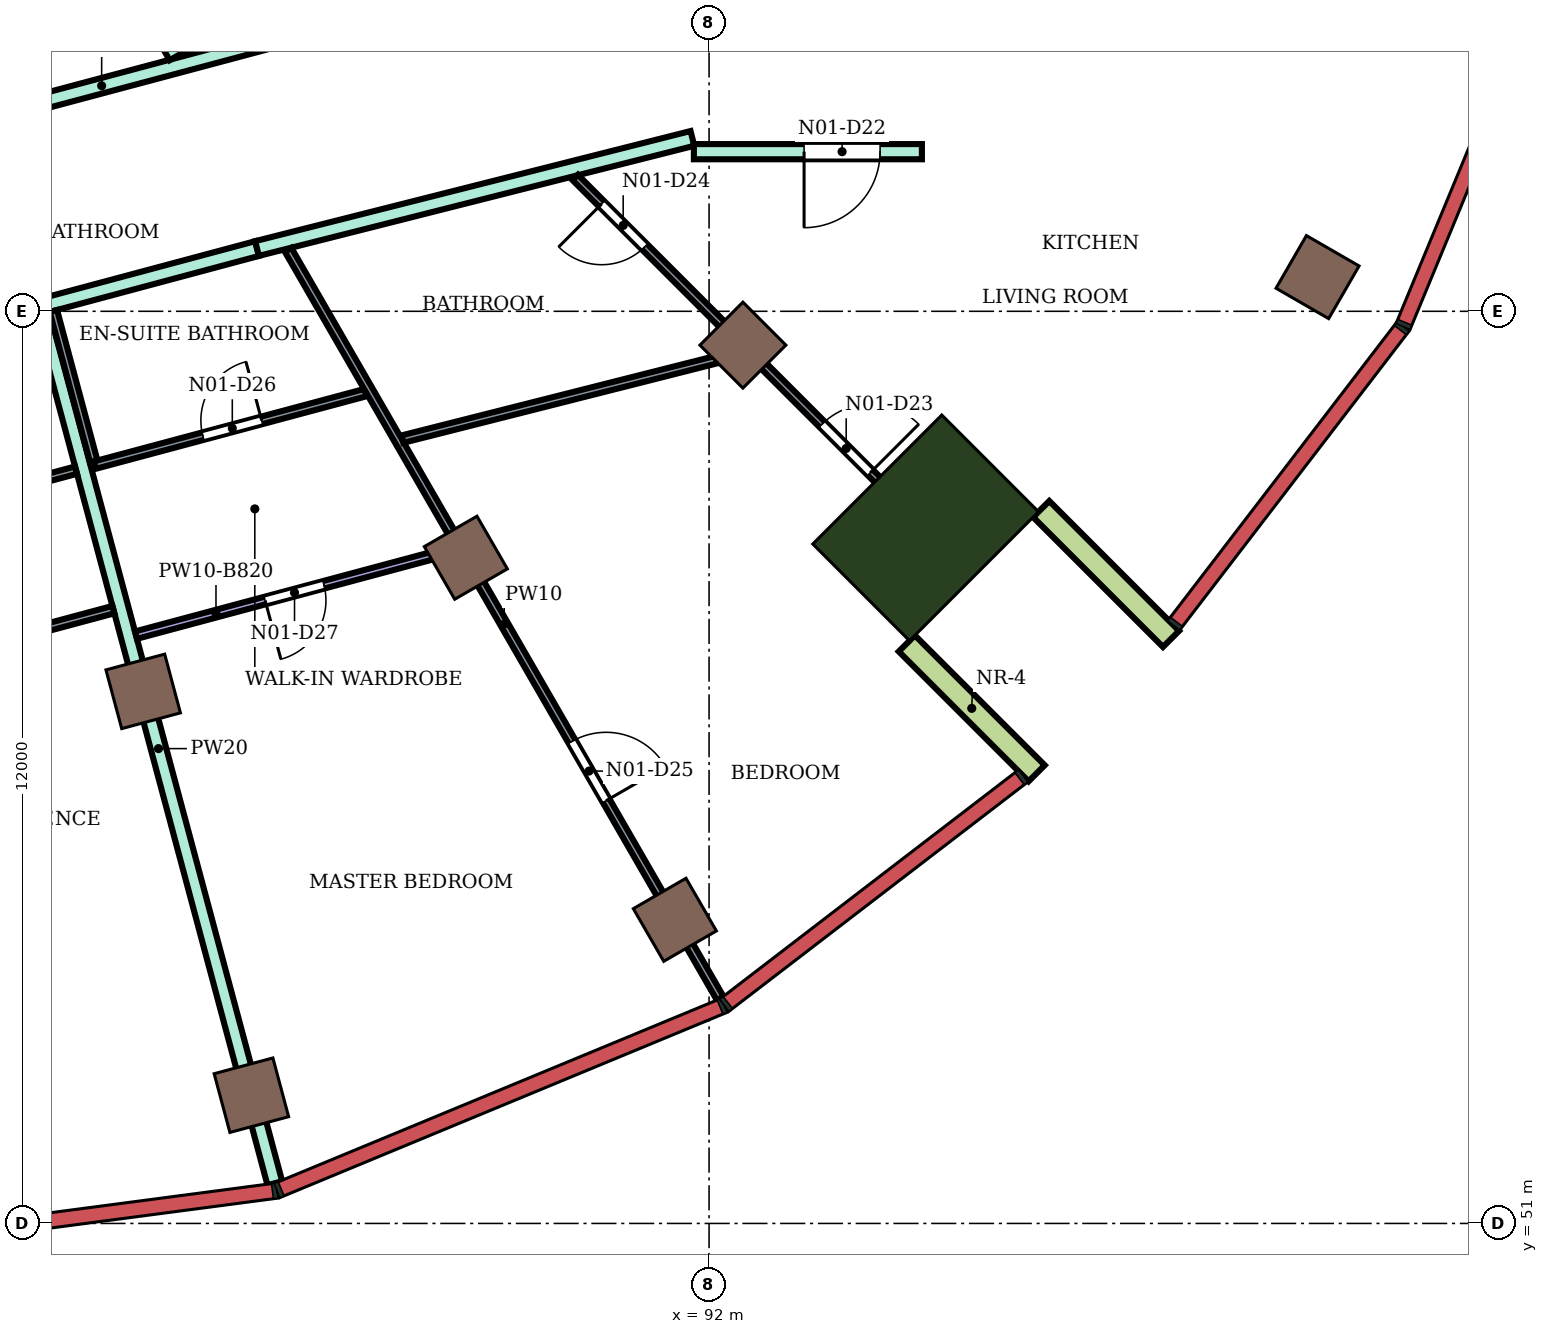
"""IFC4 building model, lengths in metres.
Left out: names, types, materials, properties, quantities, classifications, styles, units other than length and angle.
Written with IfcOpenShell. Run it as: python <this file> out.ifc"""

import sys

from ifc_helpers import new_model, si_unit, direction, frame, frame_2d, origin, origin_2d, place, context, subcontext, project, spatial, rectangle, extrude, element, fill, save


model = new_model("IFC4")
c1 = context("Model", 3, precision=1e-05, world=origin(), true_north=direction((0.0, 1.0)))
c2 = subcontext(c1, "Body", "Model", "MODEL_VIEW")
j1 = project(units=[si_unit("LENGTHUNIT", "METRE"), si_unit("PLANEANGLEUNIT", "RADIAN")], contexts=[c1])
p1 = place(None, origin())
s1 = spatial("IfcSite", under=j1, at=p1, CompositionType="ELEMENT")
p2 = place(p1, origin())
s2 = spatial("IfcBuilding", under=s1, at=p2, CompositionType="ELEMENT")
p3 = place(p2, frame((0.0, 0.0, 279.9)))
s3 = spatial("IfcBuildingStorey", under=s2, at=p3, CompositionType="ELEMENT", Elevation=279.9)
for number, where, z_axis, x_axis in (
    (1, (85.979, 52.687, 0.0), (0.0, 0.0, 1.0), (0.259, -0.966, 0.0)),
    (2, (91.55, 54.995, 0.0), (0.0, 0.0, 1.0), (0.5, -0.866, 0.0)),
    (3, (100.005, 63.45, 0.0), (0.0, 0.0, 1.0), (0.866, -0.5, 0.0)),
    (4, (84.555, 58.0, 0.0), (0.0, 0.0, 1.0), (0.259, -0.966, 0.0)),
    (5, (88.8, 59.758, 0.0), (0.0, 0.0, 1.0), (0.5, -0.866, 0.0)),
    (6, (92.445, 62.555, 0.0), (0.0, 0.0, 1.0), (0.707, -0.707, 0.0)),
):
    element("IfcColumn", number, at=place(p3, frame(where, z_axis=z_axis, x_axis=x_axis)), inside=s3, PredefinedType="COLUMN", context=c2, shape_type="SweptSolid", body=[
        extrude(rectangle(XDim=0.8, YDim=0.8, at=origin_2d()), origin(), (0.0, 0.0, 1.0), 4.2),
    ])
p4 = place(p3, frame((94.849, 60.151, 0.0), z_axis=(0.0, 0.0, 1.0), x_axis=(0.707106781187, -0.707106781187, 0.0)))
e7 = element("IfcColumn", 7, at=p4, inside=s3, PredefinedType="COLUMN", context=c2, shape_type="SweptSolid", body=[
    extrude(rectangle(XDim=1.8, YDim=2.4, at=origin_2d()), origin(), (0.0, 0.0, 1.0), 4.2),
])
for number, where, z_axis, x_axis in (
    (8, (94.602, 58.63, 0.0), (0.0, 0.0, 1.0), (0.707, -0.707, 0.0)),
    (9, (96.37, 60.398, 0.0), (0.0, 0.0, 1.0), (0.707, -0.707, 0.0)),
):
    element("IfcWall", number, at=place(p3, frame(where, z_axis=z_axis, x_axis=x_axis)), inside=s3, PredefinedType="NOTDEFINED", context=c2, shape_type="SweptSolid", body=[
        extrude(rectangle(XDim=2.416, YDim=0.3, at=frame_2d((1.208, 0.0))), origin(), (0.0, 0.0, 1.0), 4.2),
    ])
p5 = place(p3, frame((80.125, 64.932, 0.0), z_axis=(0.0, 0.0, 1.0), x_axis=(0.966236955806, 0.257655089674, 0.0)))
e10 = element("IfcWall", 10, at=p5, inside=s3, PredefinedType="PARTITIONING", context=c2, shape_type="SweptSolid", body=[
    extrude(rectangle(XDim=8.039, YDim=0.2, at=frame_2d((4.02, 0.0))), origin(), (0.0, 0.0, 1.0), 3.75),
])
p6 = place(p5, frame((6.298, 0.0, 0.0)))
e11 = element("IfcOpeningElement", 11, at=p6, cuts=e10, PredefinedType="OPENING", context=c2, shape_type="SweptSolid", body=[
    extrude(rectangle(XDim=0.9, YDim=2.1, at=frame_2d((0.45, 1.05))), frame((0.0, 0.11, 0.0), z_axis=(0.0, -1.0, 0.0), x_axis=(1.0, 0.0, 0.0)), (0.0, 0.0, 1.0), 0.22),
])
p7 = place(p5, frame((2.045, 0.0, 0.0)))
e12 = element("IfcOpeningElement", 12, at=p7, cuts=e10, PredefinedType="OPENING", context=c2, shape_type="SweptSolid", body=[
    extrude(rectangle(XDim=0.9, YDim=2.1, at=frame_2d((0.45, 1.05))), frame((0.0, 0.11, 0.0), z_axis=(0.0, -1.0, 0.0), x_axis=(1.0, 0.0, 0.0)), (0.0, 0.0, 1.0), 0.22),
])
p8 = place(p3, frame((80.0, 62.204, 0.0), z_axis=(0.0, 0.0, 1.0), x_axis=(0.965960221635, 0.258690645788, 0.0)))
e13 = element("IfcWall", 13, at=p8, inside=s3, PredefinedType="PARTITIONING", context=c2, shape_type="SweptSolid", body=[
    extrude(rectangle(XDim=6.267, YDim=0.2, at=frame_2d((3.133, 0.0))), origin(), (0.0, 0.0, 1.0), 3.75),
])
p9 = place(p8, frame((0.382, 0.0, 0.0)))
e14 = element("IfcOpeningElement", 14, at=p9, cuts=e13, PredefinedType="OPENING", context=c2, shape_type="SweptSolid", body=[
    extrude(rectangle(XDim=1.0, YDim=2.1, at=frame_2d((0.5, 1.05))), frame((0.0, 0.11, 0.0), z_axis=(0.0, -1.0, 0.0), x_axis=(1.0, 0.0, 0.0)), (0.0, 0.0, 1.0), 0.22),
])
p10 = place(p3, frame((83.225, 62.965, 0.0), z_axis=(0.0, 0.0, 1.0), x_axis=(0.258656021451, -0.965969493601, 0.0)))
e15 = element("IfcWall", 15, at=p10, inside=s3, PredefinedType="PARTITIONING", context=c2, shape_type="SweptSolid", body=[
    extrude(rectangle(XDim=11.838, YDim=0.2, at=frame_2d((5.919, 0.0))), origin(), (0.0, 0.0, 1.0), 3.75),
])
p11 = place(p3, frame((83.848, 68.332, 0.0), z_axis=(0.0, 0.0, 1.0), x_axis=(0.499953638813, -0.866052168773, 0.0)))
e16 = element("IfcWall", 16, at=p11, inside=s3, PredefinedType="PARTITIONING", context=c2, shape_type="SweptSolid", body=[
    extrude(rectangle(XDim=2.285, YDim=0.2, at=frame_2d((1.143, 0.0))), origin(), (0.0, 0.0, 1.0), 3.75),
])
p12 = place(p3, frame((86.053, 63.826, 0.0), z_axis=(0.0, 0.0, 1.0), x_axis=(0.969490004987, 0.245130843083, 0.0)))
e17 = element("IfcWall", 17, at=p12, inside=s3, PredefinedType="PARTITIONING", context=c2, shape_type="SweptSolid", body=[
    extrude(rectangle(XDim=5.908, YDim=0.2, at=frame_2d((2.954, 0.0))), origin(), (0.0, 0.0, 1.0), 3.75),
])
p13 = place(p3, frame((91.8, 65.1, 0.0), z_axis=(0.0, 0.0, 1.0), x_axis=(1.0, 0.0, 0.0)))
e18 = element("IfcWall", 18, at=p13, inside=s3, PredefinedType="PARTITIONING", context=c2, shape_type="SweptSolid", body=[
    extrude(rectangle(XDim=3.0, YDim=0.2, at=frame_2d((1.5, 0.0))), origin(), (0.0, 0.0, 1.0), 3.75),
])
p14 = place(p13, frame((1.45, 0.0, 0.0)))
e19 = element("IfcOpeningElement", 19, at=p14, cuts=e18, PredefinedType="OPENING", context=c2, shape_type="SweptSolid", body=[
    extrude(rectangle(XDim=1.0, YDim=2.1, at=frame_2d((0.5, 1.05))), frame((0.0, 0.11, 0.0), z_axis=(0.0, -1.0, 0.0), x_axis=(1.0, 0.0, 0.0)), (0.0, 0.0, 1.0), 0.22),
])
p15 = place(p3, frame((80.106, 57.988, 0.0), z_axis=(0.0, 0.0, 1.0), x_axis=(0.965893555682, 0.25893945063, 0.0)))
e20 = element("IfcWall", 20, at=p15, inside=s3, PredefinedType="PARTITIONING", context=c2, shape_type="SweptSolid", body=[
    extrude(rectangle(XDim=4.2, YDim=0.1, at=frame_2d((2.1, 0.0))), origin(), (0.0, 0.0, 1.0), 3.75),
])
p16 = place(p15, frame((1.645, 0.0, 0.0)))
e21 = element("IfcOpeningElement", 21, at=p16, cuts=e20, PredefinedType="OPENING", context=c2, shape_type="SweptSolid", body=[
    extrude(rectangle(XDim=0.9, YDim=2.1, at=frame_2d((0.45, 1.05))), frame((0.0, 0.06, 0.0), z_axis=(0.0, -1.0, 0.0), x_axis=(1.0, 0.0, 0.0)), (0.0, 0.0, 1.0), 0.12),
])
p17 = place(p3, frame((82.126, 60.496, 0.0), z_axis=(0.0, 0.0, 1.0), x_axis=(0.965930342518, 0.258802189717, 0.0)))
e22 = element("IfcWall", 22, at=p17, inside=s3, PredefinedType="PARTITIONING", context=c2, shape_type="SweptSolid", body=[
    extrude(rectangle(XDim=1.6, YDim=0.1, at=frame_2d((0.8, 0.0))), origin(), (0.0, 0.0, 1.0), 3.75),
])
p18 = place(p3, frame((83.374, 63.004, 0.0), z_axis=(0.0, 0.0, 1.0), x_axis=(0.259144823933, -0.965838475227, 0.0)))
e23 = element("IfcWall", 23, at=p18, inside=s3, PredefinedType="PARTITIONING", context=c2, shape_type="SweptSolid", body=[
    extrude(rectangle(XDim=2.05, YDim=0.1, at=frame_2d((1.025, 0.0))), origin(), (0.0, 0.0, 1.0), 3.75),
])
p19 = place(p3, frame((83.918, 60.976, 0.0), z_axis=(0.0, 0.0, 1.0), x_axis=(0.965914351064, 0.258861867428, 0.0)))
e24 = element("IfcWall", 24, at=p19, inside=s3, PredefinedType="PARTITIONING", context=c2, shape_type="SweptSolid", body=[
    extrude(rectangle(XDim=3.687, YDim=0.1, at=frame_2d((1.843, 0.0))), origin(), (0.0, 0.0, 1.0), 3.75),
])
p20 = place(p19, frame((1.473, 0.0, 0.0)))
e25 = element("IfcOpeningElement", 25, at=p20, cuts=e24, PredefinedType="OPENING", context=c2, shape_type="SweptSolid", body=[
    extrude(rectangle(XDim=0.8, YDim=2.1, at=frame_2d((0.4, 1.05))), frame((0.0, 0.06, 0.0), z_axis=(0.0, -1.0, 0.0), x_axis=(1.0, 0.0, 0.0)), (0.0, 0.0, 1.0), 0.12),
])
p21 = place(p3, frame((84.461, 58.74, 0.0), z_axis=(0.0, 0.0, 1.0), x_axis=(0.965893774063, 0.258938636026, 0.0)))
e26 = element("IfcWall", 26, at=p21, inside=s3, PredefinedType="PARTITIONING", context=c2, shape_type="SweptSolid", body=[
    extrude(rectangle(XDim=4.358, YDim=0.1, at=frame_2d((2.179, 0.0))), origin(), (0.0, 0.0, 1.0), 3.38),
])
p22 = place(p21, frame((1.759, 0.0, 0.0)))
e27 = element("IfcOpeningElement", 27, at=p22, cuts=e26, PredefinedType="OPENING", context=c2, shape_type="SweptSolid", body=[
    extrude(rectangle(XDim=0.8, YDim=2.1, at=frame_2d((0.4, 1.05))), frame((0.0, 0.06, 0.0), z_axis=(0.0, -1.0, 0.0), x_axis=(1.0, 0.0, 0.0)), (0.0, 0.0, 1.0), 0.12),
])
p23 = place(p3, frame((86.461, 63.81, 0.0), z_axis=(0.0, 0.0, 1.0), x_axis=(0.499933609462, -0.866063730986, 0.0)))
e28 = element("IfcWall", 28, at=p23, inside=s3, PredefinedType="PARTITIONING", context=c2, shape_type="SweptSolid", body=[
    extrude(rectangle(XDim=11.376, YDim=0.1, at=frame_2d((5.688, 0.0))), origin(), (0.0, 0.0, 1.0), 3.75),
])
p24 = place(p23, frame((7.47, 0.0, 0.0)))
e29 = element("IfcOpeningElement", 29, at=p24, cuts=e28, PredefinedType="OPENING", context=c2, shape_type="SweptSolid", body=[
    extrude(rectangle(XDim=0.9, YDim=2.1, at=frame_2d((0.45, 1.05))), frame((0.0, 0.06, 0.0), z_axis=(0.0, -1.0, 0.0), x_axis=(1.0, 0.0, 0.0)), (0.0, 0.0, 1.0), 0.12),
])
p25 = place(p3, frame((87.966, 61.319, 0.0), z_axis=(0.0, 0.0, 1.0), x_axis=(0.969427184869, 0.245379162189, 0.0)))
e30 = element("IfcWall", 30, at=p25, inside=s3, PredefinedType="PARTITIONING", context=c2, shape_type="SweptSolid", body=[
    extrude(rectangle(XDim=4.625, YDim=0.1, at=frame_2d((2.312, 0.0))), origin(), (0.0, 0.0, 1.0), 3.75),
])
p26 = place(p3, frame((90.239, 64.761, 0.0), z_axis=(0.0, 0.0, 1.0), x_axis=(0.707106781187, -0.707106781187, 0.0)))
e31 = element("IfcWall", 31, at=p26, inside=s3, PredefinedType="PARTITIONING", context=c2, shape_type="SweptSolid", body=[
    extrude(rectangle(XDim=7.22, YDim=0.1, at=frame_2d((3.61, 0.0))), origin(), (0.0, 0.0, 1.0), 3.75),
])
p27 = place(p26, frame((4.592, 0.0, 0.0)))
e32 = element("IfcOpeningElement", 32, at=p27, cuts=e31, PredefinedType="OPENING", context=c2, shape_type="SweptSolid", body=[
    extrude(rectangle(XDim=0.9, YDim=2.1, at=frame_2d((0.45, 1.05))), frame((0.0, 0.06, 0.0), z_axis=(0.0, -1.0, 0.0), x_axis=(1.0, 0.0, 0.0)), (0.0, 0.0, 1.0), 0.12),
])
p28 = place(p26, frame((0.492, 0.0, 0.0)))
e33 = element("IfcOpeningElement", 33, at=p28, cuts=e31, PredefinedType="OPENING", context=c2, shape_type="SweptSolid", body=[
    extrude(rectangle(XDim=0.8, YDim=2.1, at=frame_2d((0.4, 1.05))), frame((0.0, 0.06, 0.0), z_axis=(0.0, -1.0, 0.0), x_axis=(1.0, 0.0, 0.0)), (0.0, 0.0, 1.0), 0.12),
])
p29 = place(p14, frame((1.0, 0.0, 0.0), z_axis=(0.0, 0.0, 1.0), x_axis=(-1.0, 0.0, 0.0)))
e34 = element("IfcDoor", 34, at=p29, inside=s3, OperationType="SINGLE_SWING_RIGHT", PredefinedType="DOOR", context=c2, shape_type="SweptSolid", body=[
    extrude(rectangle(XDim=1.0, YDim=2.1, at=frame_2d((0.5, 1.05))), frame((0.0, 0.025, 0.0), z_axis=(0.0, -1.0, 0.0), x_axis=(1.0, 0.0, 0.0)), (0.0, 0.0, 1.0), 0.05),
])
fill(e19, e34)
p30 = place(p27, origin())
e35 = element("IfcDoor", 35, at=p30, inside=s3, OperationType="SINGLE_SWING_RIGHT", PredefinedType="DOOR", context=c2, shape_type="SweptSolid", body=[
    extrude(rectangle(XDim=0.9, YDim=2.1, at=frame_2d((0.45, 1.05))), frame((0.0, 0.025, 0.0), z_axis=(0.0, -1.0, 0.0), x_axis=(1.0, 0.0, 0.0)), (0.0, 0.0, 1.0), 0.05),
])
fill(e32, e35)
p31 = place(p28, frame((0.8, 0.0, 0.0), z_axis=(0.0, 0.0, 1.0), x_axis=(-1.0, 0.0, 0.0)))
e36 = element("IfcDoor", 36, at=p31, inside=s3, OperationType="SINGLE_SWING_RIGHT", PredefinedType="DOOR", context=c2, shape_type="SweptSolid", body=[
    extrude(rectangle(XDim=0.8, YDim=2.1, at=frame_2d((0.4, 1.05))), frame((0.0, 0.025, 0.0), z_axis=(0.0, -1.0, 0.0), x_axis=(1.0, 0.0, 0.0)), (0.0, 0.0, 1.0), 0.05),
])
fill(e33, e36)
p32 = place(p24, origin())
e37 = element("IfcDoor", 37, at=p32, inside=s3, OperationType="SINGLE_SWING_RIGHT", PredefinedType="DOOR", context=c2, shape_type="SweptSolid", body=[
    extrude(rectangle(XDim=0.9, YDim=2.1, at=frame_2d((0.45, 1.05))), frame((0.0, 0.025, 0.0), z_axis=(0.0, -1.0, 0.0), x_axis=(1.0, 0.0, 0.0)), (0.0, 0.0, 1.0), 0.05),
])
fill(e29, e37)
p33 = place(p20, origin())
e38 = element("IfcDoor", 38, at=p33, inside=s3, OperationType="SINGLE_SWING_RIGHT", PredefinedType="DOOR", context=c2, shape_type="SweptSolid", body=[
    extrude(rectangle(XDim=0.8, YDim=2.1, at=frame_2d((0.4, 1.05))), frame((0.0, 0.025, 0.0), z_axis=(0.0, -1.0, 0.0), x_axis=(1.0, 0.0, 0.0)), (0.0, 0.0, 1.0), 0.05),
])
fill(e25, e38)
p34 = place(p22, frame((0.8, 0.0, 0.0), z_axis=(0.0, 0.0, 1.0), x_axis=(-1.0, 0.0, 0.0)))
e39 = element("IfcDoor", 39, at=p34, inside=s3, OperationType="SINGLE_SWING_RIGHT", PredefinedType="DOOR", context=c2, shape_type="SweptSolid", body=[
    extrude(rectangle(XDim=0.8, YDim=2.1, at=frame_2d((0.4, 1.05))), frame((0.0, 0.025, 0.0), z_axis=(0.0, -1.0, 0.0), x_axis=(1.0, 0.0, 0.0)), (0.0, 0.0, 1.0), 0.05),
])
fill(e27, e39)
save(model, sys.argv[1])
